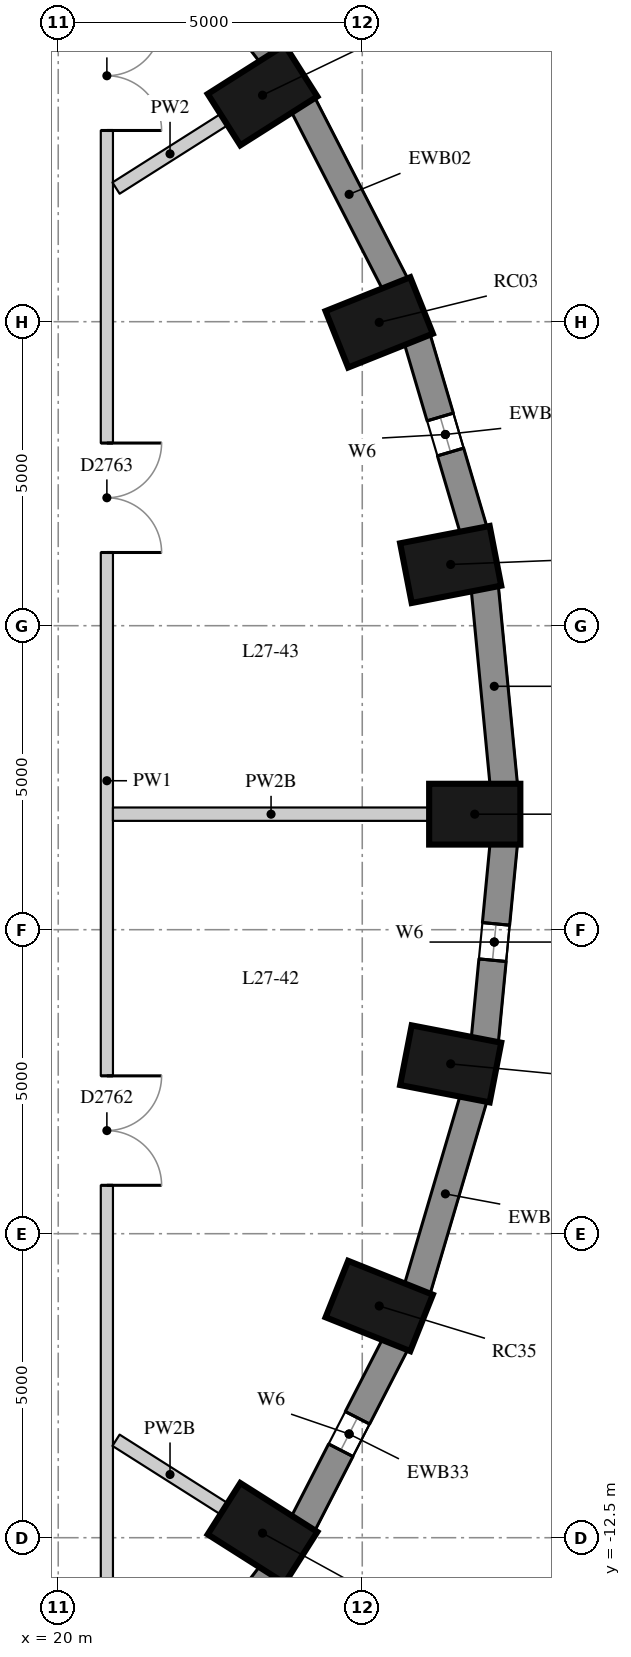
"""IFC4 building model, lengths in metres.
Left out: names, types, materials, properties, quantities, classifications, styles, units other than length and angle.
Written with IfcOpenShell. Run it as: python <this file> out.ifc"""

import sys

from ifc_helpers import new_model, si_unit, direction, frame, frame_2d, origin, origin_2d, place, context, subcontext, project, spatial, rectangle, extrude, element, fill, save


model = new_model("IFC4")
c1 = context("Model", 3, precision=1e-05, world=origin(), true_north=direction((0.0, 1.0)))
c2 = subcontext(c1, "Body", "Model", "MODEL_VIEW")
j1 = project(units=[si_unit("LENGTHUNIT", "METRE"), si_unit("PLANEANGLEUNIT", "RADIAN")], contexts=[c1])
p1 = place(None, origin())
s1 = spatial("IfcSite", under=j1, at=p1, CompositionType="ELEMENT")
p2 = place(p1, origin())
s2 = spatial("IfcBuilding", under=s1, at=p2, CompositionType="ELEMENT")
p3 = place(p2, frame((0.0, 0.0, 98.8)))
s3 = spatial("IfcBuildingStorey", under=s2, at=p3, CompositionType="ELEMENT", Elevation=98.8)
for number, where, z_axis, x_axis in (
    (1, (26.85, -0.6, 0.0), (0.0, 0.0, 1.0), (1.0, 0.0, 0.0)),
    (2, (26.454, 3.507, 0.0), (0.0, 0.0, 1.0), (0.982, 0.19, 0.0)),
    (3, (25.279, 7.489, 0.0), (0.0, 0.0, 1.0), (0.929, 0.371, 0.0)),
    (4, (23.36, 11.225, 0.0), (0.0, 0.0, 1.0), (0.845, 0.536, 0.0)),
    (5, (23.36, -12.425, 0.0), (0.0, 0.0, 1.0), (0.845, -0.536, 0.0)),
    (6, (25.279, -8.689, 0.0), (0.0, 0.0, 1.0), (0.929, -0.371, 0.0)),
    (7, (26.454, -4.707, 0.0), (0.0, 0.0, 1.0), (0.982, -0.19, 0.0)),
):
    element("IfcColumn", number, at=place(p3, frame(where, z_axis=z_axis, x_axis=x_axis)), inside=s3, PredefinedType="COLUMN", context=c2, shape_type="SweptSolid", body=[
        extrude(rectangle(XDim=1.5, YDim=1.0, at=origin_2d()), origin(), (0.0, 0.0, 1.0), 3.3),
    ])
p4 = place(p3, frame((27.328, -0.12, 0.0), z_axis=(0.0, 0.0, 1.0), x_axis=(-0.09589355735, 0.995391594127, 0.0)))
e8 = element("IfcWall", 8, at=p4, inside=s3, PredefinedType="SOLIDWALL", context=c2, shape_type="SweptSolid", body=[
    extrude(rectangle(XDim=3.261, YDim=0.45, at=frame_2d((1.631, 0.0))), origin(), (0.0, 0.0, 1.0), 3.02),
])
p5 = place(p3, frame((26.832, 4.069, 0.0), z_axis=(0.0, 0.0, 1.0), x_axis=(-0.283002902729, 0.959119052593, 0.0)))
e9 = element("IfcWall", 9, at=p5, inside=s3, PredefinedType="SOLIDWALL", context=c2, shape_type="SweptSolid", body=[
    extrude(rectangle(XDim=3.286, YDim=0.45, at=frame_2d((1.643, 0.0))), origin(), (0.0, 0.0, 1.0), 3.02),
])
p6 = place(p5, frame((1.343, 0.0, 0.4)))
e10 = element("IfcOpeningElement", 10, at=p6, cuts=e9, PredefinedType="OPENING", context=c2, shape_type="SweptSolid", body=[
    extrude(rectangle(XDim=0.6, YDim=1.75, at=frame_2d((0.3, 0.875))), frame((0.0, 0.235, 0.0), z_axis=(0.0, -1.0, 0.0), x_axis=(1.0, 0.0, 0.0)), (0.0, 0.0, 1.0), 0.47),
])
p7 = place(p3, frame((25.545, 8.112, 0.0), z_axis=(0.0, 0.0, 1.0), x_axis=(-0.456828186229, 0.889554949549, 0.0)))
e11 = element("IfcWall", 11, at=p7, inside=s3, PredefinedType="SOLIDWALL", context=c2, shape_type="SweptSolid", body=[
    extrude(rectangle(XDim=3.333, YDim=0.45, at=frame_2d((1.667, 0.0))), origin(), (0.0, 0.0, 1.0), 3.02),
])
p8 = place(p3, frame((23.508, 11.887, 0.0), z_axis=(0.0, 0.0, 1.0), x_axis=(-0.610693945156, 0.791866721961, 0.0)))
e12 = element("IfcWall", 12, at=p8, inside=s3, PredefinedType="SOLIDWALL", context=c2, shape_type="SweptSolid", body=[
    extrude(rectangle(XDim=3.395, YDim=0.45, at=frame_2d((1.697, 0.0))), origin(), (0.0, 0.0, 1.0), 3.02),
])
p9 = place(p8, frame((1.397, 0.0, 0.4)))
e13 = element("IfcOpeningElement", 13, at=p9, cuts=e12, PredefinedType="OPENING", context=c2, shape_type="SweptSolid", body=[
    extrude(rectangle(XDim=0.6, YDim=1.75, at=frame_2d((0.3, 0.875))), frame((0.0, 0.235, 0.0), z_axis=(0.0, -1.0, 0.0), x_axis=(1.0, 0.0, 0.0)), (0.0, 0.0, 1.0), 0.47),
])
p10 = place(p3, frame((21.435, -15.775, 0.0), z_axis=(0.0, 0.0, 1.0), x_axis=(0.610693945156, 0.791866721961, 0.0)))
e14 = element("IfcWall", 14, at=p10, inside=s3, PredefinedType="SOLIDWALL", context=c2, shape_type="SweptSolid", body=[
    extrude(rectangle(XDim=3.395, YDim=0.45, at=frame_2d((1.697, 0.0))), origin(), (0.0, 0.0, 1.0), 3.02),
])
p11 = place(p3, frame((24.023, -12.277, 0.0), z_axis=(0.0, 0.0, 1.0), x_axis=(0.456828186229, 0.889554949549, 0.0)))
e15 = element("IfcWall", 15, at=p11, inside=s3, PredefinedType="SOLIDWALL", context=c2, shape_type="SweptSolid", body=[
    extrude(rectangle(XDim=3.333, YDim=0.45, at=frame_2d((1.667, 0.0))), origin(), (0.0, 0.0, 1.0), 3.02),
])
p12 = place(p11, frame((1.366, 0.0, 0.4)))
e16 = element("IfcOpeningElement", 16, at=p12, cuts=e15, PredefinedType="OPENING", context=c2, shape_type="SweptSolid", body=[
    extrude(rectangle(XDim=0.6, YDim=1.75, at=frame_2d((0.3, 0.875))), frame((0.0, 0.235, 0.0), z_axis=(0.0, -1.0, 0.0), x_axis=(1.0, 0.0, 0.0)), (0.0, 0.0, 1.0), 0.47),
])
p13 = place(p3, frame((25.902, -8.421, 0.0), z_axis=(0.0, 0.0, 1.0), x_axis=(0.282982737009, 0.95912500257, 0.0)))
e17 = element("IfcWall", 17, at=p13, inside=s3, PredefinedType="SOLIDWALL", context=c2, shape_type="SweptSolid", body=[
    extrude(rectangle(XDim=3.286, YDim=0.45, at=frame_2d((1.643, 0.0))), origin(), (0.0, 0.0, 1.0), 3.02),
])
p14 = place(p3, frame((27.015, -4.326, 0.0), z_axis=(0.0, 0.0, 1.0), x_axis=(0.09589355735, 0.995391594127, 0.0)))
e18 = element("IfcWall", 18, at=p14, inside=s3, PredefinedType="SOLIDWALL", context=c2, shape_type="SweptSolid", body=[
    extrude(rectangle(XDim=3.261, YDim=0.45, at=frame_2d((1.631, 0.0))), origin(), (0.0, 0.0, 1.0), 3.02),
])
p15 = place(p14, frame((1.331, 0.0, 0.4)))
e19 = element("IfcOpeningElement", 19, at=p15, cuts=e18, PredefinedType="OPENING", context=c2, shape_type="SweptSolid", body=[
    extrude(rectangle(XDim=0.6, YDim=1.75, at=frame_2d((0.3, 0.875))), frame((0.0, 0.235, 0.0), z_axis=(0.0, -1.0, 0.0), x_axis=(1.0, 0.0, 0.0)), (0.0, 0.0, 1.0), 0.47),
])
p16 = place(p3, frame((20.8, 13.5, 0.0), z_axis=(0.0, 0.0, 1.0), x_axis=(0.0, -1.0, 0.0)))
e20 = element("IfcWall", 20, at=p16, inside=s3, PredefinedType="PARTITIONING", context=c2, shape_type="SweptSolid", body=[
    extrude(rectangle(XDim=27.1, YDim=0.2, at=frame_2d((13.55, 0.0))), origin(), (0.0, 0.0, 1.0), 3.02),
])
p17 = place(p16, frame((18.404, 0.0, 0.0)))
e21 = element("IfcOpeningElement", 21, at=p17, cuts=e20, PredefinedType="OPENING", context=c2, shape_type="SweptSolid", body=[
    extrude(rectangle(XDim=1.8, YDim=2.1, at=frame_2d((0.9, 1.05))), frame((0.0, 0.11, 0.0), z_axis=(0.0, -1.0, 0.0), x_axis=(1.0, 0.0, 0.0)), (0.0, 0.0, 1.0), 0.22),
])
p18 = place(p16, frame((7.996, 0.0, 0.0)))
e22 = element("IfcOpeningElement", 22, at=p18, cuts=e20, PredefinedType="OPENING", context=c2, shape_type="SweptSolid", body=[
    extrude(rectangle(XDim=1.8, YDim=2.1, at=frame_2d((0.9, 1.05))), frame((0.0, 0.11, 0.0), z_axis=(0.0, -1.0, 0.0), x_axis=(1.0, 0.0, 0.0)), (0.0, 0.0, 1.0), 0.22),
])
p19 = place(p16, frame((1.055, 0.0, 0.0)))
e23 = element("IfcOpeningElement", 23, at=p19, cuts=e20, PredefinedType="OPENING", context=c2, shape_type="SweptSolid", body=[
    extrude(rectangle(XDim=1.8, YDim=2.1, at=frame_2d((0.9, 1.05))), frame((0.0, 0.11, 0.0), z_axis=(0.0, -1.0, 0.0), x_axis=(1.0, 0.0, 0.0)), (0.0, 0.0, 1.0), 0.22),
])
p20 = place(p3, frame((26.1, -0.6, 0.0), z_axis=(0.0, 0.0, 1.0), x_axis=(-1.0, 0.0, 0.0)))
e24 = element("IfcWall", 24, at=p20, inside=s3, PredefinedType="PARTITIONING", context=c2, shape_type="SweptSolid", body=[
    extrude(rectangle(XDim=5.2, YDim=0.22, at=frame_2d((2.6, 0.0))), origin(), (0.0, 0.0, 1.0), 2.57),
])
p21 = place(p3, frame((22.727, 10.823, 0.0), z_axis=(0.0, 0.0, 1.0), x_axis=(-0.844549560094, -0.53547739499, 0.0)))
e25 = element("IfcWall", 25, at=p21, inside=s3, PredefinedType="PARTITIONING", context=c2, shape_type="SweptSolid", body=[
    extrude(rectangle(XDim=2.103, YDim=0.22, at=frame_2d((1.051, 0.0))), origin(), (0.0, 0.0, 1.0), 3.02),
])
p22 = place(p3, frame((22.727, -12.023, 0.0), z_axis=(0.0, 0.0, 1.0), x_axis=(-0.844497052188, 0.535560200954, 0.0)))
e26 = element("IfcWall", 26, at=p22, inside=s3, PredefinedType="PARTITIONING", context=c2, shape_type="SweptSolid", body=[
    extrude(rectangle(XDim=2.103, YDim=0.22, at=frame_2d((1.051, 0.0))), origin(), (0.0, 0.0, 1.0), 2.57),
])
p23 = place(p6, origin())
e27 = element("IfcWindow", 27, at=p23, inside=s3, PartitioningType="SINGLE_PANEL", PredefinedType="WINDOW", context=c2, shape_type="SweptSolid", body=[
    extrude(rectangle(XDim=0.6, YDim=1.75, at=frame_2d((0.3, 0.875))), frame((0.0, 0.035, 0.0), z_axis=(0.0, -1.0, 0.0), x_axis=(1.0, 0.0, 0.0)), (0.0, 0.0, 1.0), 0.06),
])
fill(e10, e27)
p24 = place(p12, origin())
e28 = element("IfcWindow", 28, at=p24, inside=s3, PartitioningType="SINGLE_PANEL", PredefinedType="WINDOW", context=c2, shape_type="SweptSolid", body=[
    extrude(rectangle(XDim=0.6, YDim=1.75, at=frame_2d((0.3, 0.875))), frame((0.0, 0.035, 0.0), z_axis=(0.0, -1.0, 0.0), x_axis=(1.0, 0.0, 0.0)), (0.0, 0.0, 1.0), 0.06),
])
fill(e16, e28)
p25 = place(p15, origin())
e29 = element("IfcWindow", 29, at=p25, inside=s3, PartitioningType="SINGLE_PANEL", PredefinedType="WINDOW", context=c2, shape_type="SweptSolid", body=[
    extrude(rectangle(XDim=0.6, YDim=1.75, at=frame_2d((0.3, 0.875))), frame((0.0, 0.035, 0.0), z_axis=(0.0, -1.0, 0.0), x_axis=(1.0, 0.0, 0.0)), (0.0, 0.0, 1.0), 0.06),
])
fill(e19, e29)
p26 = place(p17, origin())
e30 = element("IfcDoor", 30, at=p26, inside=s3, OperationType="DOUBLE_DOOR_SINGLE_SWING", PredefinedType="DOOR", context=c2, shape_type="SweptSolid", body=[
    extrude(rectangle(XDim=1.8, YDim=2.1, at=frame_2d((0.9, 1.05))), frame((0.0, 0.025, 0.0), z_axis=(0.0, -1.0, 0.0), x_axis=(1.0, 0.0, 0.0)), (0.0, 0.0, 1.0), 0.05),
])
fill(e21, e30)
p27 = place(p18, origin())
e31 = element("IfcDoor", 31, at=p27, inside=s3, OperationType="DOUBLE_DOOR_SINGLE_SWING", PredefinedType="DOOR", context=c2, shape_type="SweptSolid", body=[
    extrude(rectangle(XDim=1.8, YDim=2.1, at=frame_2d((0.9, 1.05))), frame((0.0, 0.025, 0.0), z_axis=(0.0, -1.0, 0.0), x_axis=(1.0, 0.0, 0.0)), (0.0, 0.0, 1.0), 0.05),
])
fill(e22, e31)
p28 = place(p19, origin())
e32 = element("IfcDoor", 32, at=p28, inside=s3, OperationType="DOUBLE_DOOR_SINGLE_SWING", PredefinedType="DOOR", context=c2, shape_type="SweptSolid", body=[
    extrude(rectangle(XDim=1.8, YDim=2.1, at=frame_2d((0.9, 1.05))), frame((0.0, 0.025, 0.0), z_axis=(0.0, -1.0, 0.0), x_axis=(1.0, 0.0, 0.0)), (0.0, 0.0, 1.0), 0.05),
])
fill(e23, e32)
save(model, sys.argv[1])
